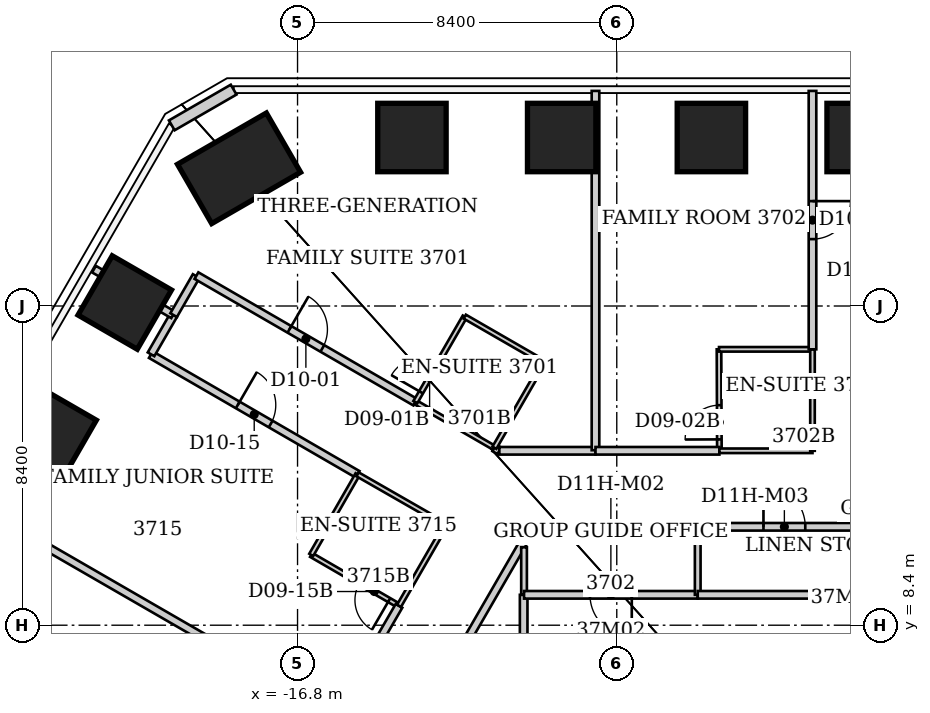
"""IFC4 building model, lengths in metres.
Left out: names, types, materials, properties, quantities, classifications, styles, units other than length and angle.
Written with IfcOpenShell. Run it as: python <this file> out.ifc"""

import sys

from ifc_helpers import new_model, si_unit, direction, frame, frame_2d, origin, origin_2d, place, context, subcontext, project, spatial, rectangle, extrude, element, fill, save


model = new_model("IFC4")
c1 = context("Model", 3, precision=1e-05, world=origin(), true_north=direction((0.0, 1.0)))
c2 = subcontext(c1, "Body", "Model", "MODEL_VIEW")
j1 = project(units=[si_unit("LENGTHUNIT", "METRE"), si_unit("PLANEANGLEUNIT", "RADIAN")], contexts=[c1])
p1 = place(None, origin())
s1 = spatial("IfcSite", under=j1, at=p1, CompositionType="ELEMENT")
p2 = place(p1, origin())
s2 = spatial("IfcBuilding", under=s1, at=p2, CompositionType="ELEMENT")
p3 = place(p2, frame((0.0, 0.0, 150.0)))
s3 = spatial("IfcBuildingStorey", under=s2, at=p3, CompositionType="ELEMENT", Elevation=150.0)
p4 = place(p3, frame((-13.79, 21.234, -0.07), z_axis=(0.030672908952, -0.047237539454, 0.998412633896), x_axis=(0.001517539958, 0.998883682108, 0.047213204619)))
e1 = element("IfcColumn", 1, at=p4, inside=s3, PredefinedType="COLUMN", context=c2, shape_type="SweptSolid", body=[
    extrude(rectangle(XDim=1.8, YDim=1.8, at=origin_2d()), origin(), (0.0, 0.0, 1.0), 3.876),
])
p5 = place(p3, frame((-9.85, 21.234, -0.062), z_axis=(0.021904461352, -0.047280811392, 0.998641436877), x_axis=(0.001524932633, 0.998881518018, 0.047258729796)))
e2 = element("IfcColumn", 2, at=p5, inside=s3, PredefinedType="COLUMN", context=c2, shape_type="SweptSolid", body=[
    extrude(rectangle(XDim=1.8, YDim=1.8, at=origin_2d()), origin(), (0.0, 0.0, 1.0), 3.868),
])
p6 = place(p3, frame((-5.91, 21.234, -0.054), z_axis=(0.013158701657, -0.047257452585, 0.998796066145), x_axis=(0.000510527597, 0.998882736188, 0.047254827349)))
e3 = element("IfcColumn", 3, at=p6, inside=s3, PredefinedType="COLUMN", context=c2, shape_type="SweptSolid", body=[
    extrude(rectangle(XDim=1.8, YDim=1.8, at=origin_2d()), origin(), (0.0, 0.0, 1.0), 3.859),
])
p7 = place(p3, frame((-1.97, 21.234, -0.046), z_axis=(0.004374618876, -0.047296604079, 0.998871310006), x_axis=(0.000487124641, 0.998880850263, 0.047294922418)))
e4 = element("IfcColumn", 4, at=p7, inside=s3, PredefinedType="COLUMN", context=c2, shape_type="SweptSolid", body=[
    extrude(rectangle(XDim=1.8, YDim=1.8, at=origin_2d()), origin(), (0.0, 0.0, 1.0), 3.851),
])
p8 = place(p3, frame((-23.324, 13.466, -0.053), z_axis=(0.0511051556, -0.029474013007, 0.998258255978), x_axis=(-0.864748173328, 0.498728525707, 0.058995375849)))
e5 = element("IfcColumn", 5, at=p8, inside=s3, PredefinedType="COLUMN", context=c2, shape_type="SweptSolid", body=[
    extrude(rectangle(XDim=1.8, YDim=1.8, at=origin_2d()), origin(), (0.0, 0.0, 1.0), 3.86),
])
p9 = place(p3, frame((-21.346, 16.891, -0.061), z_axis=(0.046773827899, -0.036989828811, 0.998220397301), x_axis=(-0.864919891938, 0.498430416416, 0.058997461992)))
e6 = element("IfcColumn", 6, at=p9, inside=s3, PredefinedType="COLUMN", context=c2, shape_type="SweptSolid", body=[
    extrude(rectangle(XDim=1.8, YDim=1.8, at=origin_2d()), origin(), (0.0, 0.0, 1.0), 3.868),
])
p10 = place(p3, frame((-18.339, 20.424, -0.071), z_axis=(0.041102575275, -0.045760447511, 0.998106487179), x_axis=(-0.498560434841, 0.864763607509, 0.060178035354)))
e7 = element("IfcColumn", 7, at=p10, inside=s3, PredefinedType="COLUMN", context=c2, shape_type="SweptSolid", body=[
    extrude(rectangle(XDim=1.8, YDim=2.7, at=origin_2d()), origin(), (0.0, 0.0, 1.0), 3.879),
])
p11 = place(p3, frame((-20.11, 21.554, 0.0), z_axis=(0.0, 0.0, 1.0), x_axis=(0.865988793993, 0.500063404658, 0.0)))
e8 = element("IfcWall", 8, at=p11, inside=s3, PredefinedType="SOLIDWALL", context=c2, shape_type="SweptSolid", body=[
    extrude(rectangle(XDim=1.88, YDim=0.3, at=frame_2d((0.94, 0.0))), origin(), (0.0, 0.0, 1.0), 3.64),
])
p12 = place(p3, frame((-25.714, 11.795, 0.0), z_axis=(0.0, 0.0, 1.0), x_axis=(0.866045467449, -0.499965247104, 0.0)))
e9 = element("IfcWall", 9, at=p12, inside=s3, PredefinedType="PARTITIONING", context=c2, shape_type="SweptSolid", body=[
    extrude(rectangle(XDim=11.461, YDim=0.2, at=frame_2d((5.73, 0.0))), origin(), (0.0, 0.0, 1.0), 3.64),
])
p13 = place(p3, frame((-20.66, 15.52, 0.0), z_axis=(0.0, 0.0, 1.0), x_axis=(0.86537753305, -0.501120469839, 0.0)))
e10 = element("IfcWall", 10, at=p13, inside=s3, PredefinedType="PARTITIONING", context=c2, shape_type="SweptSolid", body=[
    extrude(rectangle(XDim=6.286, YDim=0.2, at=frame_2d((3.143, 0.0))), origin(), (0.0, 0.0, 1.0), 3.64),
])
p14 = place(p13, frame((2.643, 0.0, 0.0)))
e11 = element("IfcOpeningElement", 11, at=p14, cuts=e10, PredefinedType="OPENING", context=c2, shape_type="SweptSolid", body=[
    extrude(rectangle(XDim=1.0, YDim=2.13, at=frame_2d((0.5, 1.065))), frame((0.0, 0.1, 0.0), z_axis=(0.0, -1.0, 0.0), x_axis=(1.0, 0.0, 0.0)), (0.0, 0.0, 1.0), 0.2),
])
p15 = place(p3, frame((-20.655, 15.529, 0.0), z_axis=(0.0, 0.0, 1.0), x_axis=(0.49964553876, 0.86622995538, 0.0)))
e12 = element("IfcWall", 12, at=p15, inside=s3, PredefinedType="PARTITIONING", context=c2, shape_type="SweptSolid", body=[
    extrude(rectangle(XDim=1.191, YDim=0.2, at=frame_2d((0.595, 0.0))), origin(), (0.0, 0.0, 1.0), 3.64),
])
p16 = place(p3, frame((-20.073, 16.567, 0.0), z_axis=(0.0, 0.0, 1.0), x_axis=(-0.866023315909, 0.500003616288, 0.0)))
e13 = element("IfcWall", 13, at=p16, inside=s3, PredefinedType="PARTITIONING", context=c2, shape_type="SweptSolid", body=[
    extrude(rectangle(XDim=2.405, YDim=0.2, at=frame_2d((1.203, 0.0))), origin(), (0.0, 0.0, 1.0), 3.64),
])
p17 = place(p3, frame((-20.06, 16.56, 0.0), z_axis=(0.0, 0.0, 1.0), x_axis=(0.499704629046, 0.866195869137, 0.0)))
e14 = element("IfcWall", 14, at=p17, inside=s3, PredefinedType="PARTITIONING", context=c2, shape_type="SweptSolid", body=[
    extrude(rectangle(XDim=1.186, YDim=0.2, at=frame_2d((0.593, 0.0))), origin(), (0.0, 0.0, 1.0), 3.64),
])
p18 = place(p3, frame((-19.46, 17.6, 0.0), z_axis=(0.0, 0.0, 1.0), x_axis=(0.865623013862, -0.50069631302, 0.0)))
e15 = element("IfcWall", 15, at=p18, inside=s3, PredefinedType="PARTITIONING", context=c2, shape_type="SweptSolid", body=[
    extrude(rectangle(XDim=6.653, YDim=0.2, at=frame_2d((3.327, 0.0))), origin(), (0.0, 0.0, 1.0), 3.64),
])
p19 = place(p18, frame((2.827, 0.0, 0.0)))
e16 = element("IfcOpeningElement", 16, at=p19, cuts=e15, PredefinedType="OPENING", context=c2, shape_type="SweptSolid", body=[
    extrude(rectangle(XDim=1.0, YDim=2.13, at=frame_2d((0.5, 1.065))), frame((0.0, 0.1, 0.0), z_axis=(0.0, -1.0, 0.0), x_axis=(1.0, 0.0, 0.0)), (0.0, 0.0, 1.0), 0.2),
])
p20 = place(p3, frame((-16.44, 10.25, 0.0), z_axis=(0.0, 0.0, 1.0), x_axis=(0.864966903181, -0.501828911485, 0.0)))
e17 = element("IfcWall", 17, at=p20, inside=s3, PredefinedType="PARTITIONING", context=c2, shape_type="SweptSolid", body=[
    extrude(rectangle(XDim=2.67, YDim=0.12, at=frame_2d((1.335, 0.0))), origin(), (0.0, 0.0, 1.0), 3.64),
])
p21 = place(p20, frame((1.47, 0.0, 0.0)))
e18 = element("IfcOpeningElement", 18, at=p21, cuts=e17, PredefinedType="OPENING", context=c2, shape_type="SweptSolid", body=[
    extrude(rectangle(XDim=0.9, YDim=2.03, at=frame_2d((0.45, 1.015))), frame((0.0, 0.06, 0.0), z_axis=(0.0, -1.0, 0.0), x_axis=(1.0, 0.0, 0.0)), (0.0, 0.0, 1.0), 0.12),
])
p22 = place(p3, frame((-15.78, 6.06, 0.0), z_axis=(0.0, 0.0, 1.0), x_axis=(0.501088872721, 0.865395829453, 0.0)))
e19 = element("IfcWall", 19, at=p22, inside=s3, PredefinedType="PARTITIONING", context=c2, shape_type="SweptSolid", body=[
    extrude(rectangle(XDim=3.293, YDim=0.2, at=frame_2d((1.646, 0.0))), origin(), (0.0, 0.0, 1.0), 3.64),
])
p23 = place(p3, frame((-15.41, 2.7, 0.0), z_axis=(0.0, 0.0, 1.0), x_axis=(0.500237524763, 0.865888225361, 0.0)))
e20 = element("IfcWall", 20, at=p23, inside=s3, PredefinedType="PARTITIONING", context=c2, shape_type="SweptSolid", body=[
    extrude(rectangle(XDim=9.135, YDim=0.2, at=frame_2d((4.568, 0.0))), origin(), (0.0, 0.0, 1.0), 3.64),
])
p24 = place(p3, frame((-15.22, 12.37, 0.0), z_axis=(0.0, 0.0, 1.0), x_axis=(-0.498748634132, -0.866746675766, 0.0)))
e21 = element("IfcWall", 21, at=p24, inside=s3, PredefinedType="PARTITIONING", context=c2, shape_type="SweptSolid", body=[
    extrude(rectangle(XDim=2.446, YDim=0.12, at=frame_2d((1.223, 0.0))), origin(), (0.0, 0.0, 1.0), 3.64),
])
p25 = place(p3, frame((-15.22, 12.37, 0.0), z_axis=(0.0, 0.0, 1.0), x_axis=(0.867545659855, -0.497357545501, 0.0)))
e22 = element("IfcWall", 22, at=p25, inside=s3, PredefinedType="PARTITIONING", context=c2, shape_type="SweptSolid", body=[
    extrude(rectangle(XDim=2.674, YDim=0.12, at=frame_2d((1.337, 0.0))), origin(), (0.0, 0.0, 1.0), 3.64),
])
p26 = place(p3, frame((-14.13, 8.91, 0.0), z_axis=(0.0, 0.0, 1.0), x_axis=(0.500046071023, 0.865998803033, 0.0)))
e23 = element("IfcWall", 23, at=p26, inside=s3, PredefinedType="PARTITIONING", context=c2, shape_type="SweptSolid", body=[
    extrude(rectangle(XDim=2.46, YDim=0.12, at=frame_2d((1.23, 0.0))), origin(), (0.0, 0.0, 1.0), 3.64),
])
p27 = place(p3, frame((-13.701, 14.269, 0.0), z_axis=(0.0, 0.0, 1.0), x_axis=(0.865609526999, -0.500719628902, 0.0)))
e24 = element("IfcWall", 24, at=p27, inside=s3, PredefinedType="PARTITIONING", context=c2, shape_type="SweptSolid", body=[
    extrude(rectangle(XDim=2.401, YDim=0.12, at=frame_2d((1.201, 0.0))), origin(), (0.0, 0.0, 1.0), 3.64),
])
p28 = place(p3, frame((-12.4, 16.52, 0.0), z_axis=(0.0, 0.0, 1.0), x_axis=(-0.500291685314, -0.865856933682, 0.0)))
e25 = element("IfcWall", 25, at=p28, inside=s3, PredefinedType="PARTITIONING", context=c2, shape_type="SweptSolid", body=[
    extrude(rectangle(XDim=2.599, YDim=0.12, at=frame_2d((1.299, 0.0))), origin(), (0.0, 0.0, 1.0), 3.64),
])
p29 = place(p28, frame((1.399, 0.0, 0.0)))
e26 = element("IfcOpeningElement", 26, at=p29, cuts=e25, PredefinedType="OPENING", context=c2, shape_type="SweptSolid", body=[
    extrude(rectangle(XDim=0.9, YDim=2.03, at=frame_2d((0.45, 1.015))), frame((0.0, 0.06, 0.0), z_axis=(0.0, -1.0, 0.0), x_axis=(1.0, 0.0, 0.0)), (0.0, 0.0, 1.0), 0.12),
])
p30 = place(p3, frame((-11.622, 13.066, 0.0), z_axis=(0.0, 0.0, 1.0), x_axis=(0.865572302129, -0.500783975169, 0.0)))
e27 = element("IfcWall", 27, at=p30, inside=s3, PredefinedType="PARTITIONING", context=c2, shape_type="SweptSolid", body=[
    extrude(rectangle(XDim=0.153, YDim=0.2, at=frame_2d((0.076, 0.0))), origin(), (0.0, 0.0, 1.0), 3.64),
])
p31 = place(p3, frame((-11.62, 13.07, 0.0), z_axis=(0.0, 0.0, 1.0), x_axis=(0.500291685314, 0.865856933682, 0.0)))
e28 = element("IfcWall", 28, at=p31, inside=s3, PredefinedType="PARTITIONING", context=c2, shape_type="SweptSolid", body=[
    extrude(rectangle(XDim=2.599, YDim=0.12, at=frame_2d((1.299, 0.0))), origin(), (0.0, 0.0, 1.0), 3.64),
])
p32 = place(p3, frame((-10.85, 9.2, 0.0), z_axis=(0.0, 0.0, 1.0), x_axis=(0.0, -1.0, 0.0)))
e29 = element("IfcWall", 29, at=p32, inside=s3, PredefinedType="PARTITIONING", context=c2, shape_type="SweptSolid", body=[
    extrude(rectangle(XDim=14.39, YDim=0.2, at=frame_2d((7.195, 0.0))), origin(), (0.0, 0.0, 1.0), 3.64),
])
p33 = place(p32, frame((6.645, 0.0, 0.0)))
e30 = element("IfcOpeningElement", 30, at=p33, cuts=e29, PredefinedType="OPENING", context=c2, shape_type="SweptSolid", body=[
    extrude(rectangle(XDim=1.1, YDim=2.2, at=frame_2d((0.55, 1.1))), frame((0.0, 0.1, 0.0), z_axis=(0.0, -1.0, 0.0), x_axis=(1.0, 0.0, 0.0)), (0.0, 0.0, 1.0), 0.2),
])
p34 = place(p3, frame((-10.84, 10.45, 0.0), z_axis=(0.0, 0.0, 1.0), x_axis=(0.0, -1.0, 0.0)))
e31 = element("IfcWall", 31, at=p34, inside=s3, PredefinedType="PARTITIONING", context=c2, shape_type="SweptSolid", body=[
    extrude(rectangle(XDim=1.25, YDim=0.15, at=frame_2d((0.625, 0.0))), origin(), (0.0, 0.0, 1.0), 3.64),
])
p35 = place(p3, frame((-10.84, 10.61, 0.0), z_axis=(0.0, 0.0, 1.0), x_axis=(0.501518373175, 0.865146994081, 0.0)))
e32 = element("IfcWall", 32, at=p35, inside=s3, PredefinedType="PARTITIONING", context=c2, shape_type="SweptSolid", body=[
    extrude(rectangle(XDim=0.439, YDim=0.2, at=frame_2d((0.22, 0.0))), origin(), (0.0, 0.0, 1.0), 3.64),
])
p36 = place(p3, frame((-10.62, 10.99, 0.0), z_axis=(0.0, 0.0, 1.0), x_axis=(1.0, 0.0, 0.0)))
e33 = element("IfcWall", 33, at=p36, inside=s3, PredefinedType="PARTITIONING", context=c2, shape_type="SweptSolid", body=[
    extrude(rectangle(XDim=4.35, YDim=0.2, at=frame_2d((2.175, 0.0))), origin(), (0.0, 0.0, 1.0), 3.64),
])
p37 = place(p3, frame((-10.32, 15.32, 0.0), z_axis=(0.0, 0.0, 1.0), x_axis=(-0.866177122335, 0.499737123639, 0.0)))
e34 = element("IfcWall", 34, at=p37, inside=s3, PredefinedType="PARTITIONING", context=c2, shape_type="SweptSolid", body=[
    extrude(rectangle(XDim=2.401, YDim=0.12, at=frame_2d((1.201, 0.0))), origin(), (0.0, 0.0, 1.0), 3.64),
])
p38 = place(p3, frame((-8.96, 12.99, 0.0), z_axis=(0.0, 0.0, 1.0), x_axis=(-1.0, 0.0, 0.0)))
e35 = element("IfcWall", 35, at=p38, inside=s3, PredefinedType="PARTITIONING", context=c2, shape_type="SweptSolid", body=[
    extrude(rectangle(XDim=2.53, YDim=0.2, at=frame_2d((1.265, 0.0))), origin(), (0.0, 0.0, 1.0), 3.64),
])
p39 = place(p3, frame((-8.96, 22.46, 0.0), z_axis=(0.0, 0.0, 1.0), x_axis=(0.0, -1.0, 0.0)))
e36 = element("IfcWall", 36, at=p39, inside=s3, PredefinedType="PARTITIONING", context=c2, shape_type="SweptSolid", body=[
    extrude(rectangle(XDim=9.455, YDim=0.2, at=frame_2d((4.728, 0.0))), origin(), (0.0, 0.0, 1.0), 3.64),
])
p40 = place(p3, frame((-6.27, 9.2, 0.0), z_axis=(0.0, 0.0, 1.0), x_axis=(-1.0, 0.0, 0.0)))
e37 = element("IfcWall", 37, at=p40, inside=s3, PredefinedType="PARTITIONING", context=c2, shape_type="SweptSolid", body=[
    extrude(rectangle(XDim=4.57, YDim=0.2, at=frame_2d((2.285, 0.0))), origin(), (0.0, 0.0, 1.0), 3.64),
])
p41 = place(p40, frame((1.735, 0.0, 0.0)))
e38 = element("IfcOpeningElement", 38, at=p41, cuts=e37, PredefinedType="OPENING", context=c2, shape_type="SweptSolid", body=[
    extrude(rectangle(XDim=1.1, YDim=2.2, at=frame_2d((0.55, 1.1))), frame((0.0, 0.1, 0.0), z_axis=(0.0, -1.0, 0.0), x_axis=(1.0, 0.0, 0.0)), (0.0, 0.0, 1.0), 0.2),
])
p42 = place(p3, frame((-6.27, 10.99, 0.0), z_axis=(0.0, 0.0, 1.0), x_axis=(0.0, -1.0, 0.0)))
e39 = element("IfcWall", 39, at=p42, inside=s3, PredefinedType="PARTITIONING", context=c2, shape_type="SweptSolid", body=[
    extrude(rectangle(XDim=1.79, YDim=0.15, at=frame_2d((0.895, 0.0))), origin(), (0.0, 0.0, 1.0), 3.64),
])
p43 = place(p3, frame((-6.27, 10.99, 0.0), z_axis=(0.0, 0.0, 1.0), x_axis=(1.0, 0.0, 0.0)))
e40 = element("IfcWall", 40, at=p43, inside=s3, PredefinedType="PARTITIONING", context=c2, shape_type="SweptSolid", body=[
    extrude(rectangle(XDim=4.56, YDim=0.2, at=frame_2d((2.28, 0.0))), origin(), (0.0, 0.0, 1.0), 3.64),
])
p44 = place(p43, frame((1.73, 0.0, 0.0)))
e41 = element("IfcOpeningElement", 41, at=p44, cuts=e40, PredefinedType="OPENING", context=c2, shape_type="SweptSolid", body=[
    extrude(rectangle(XDim=1.1, YDim=2.2, at=frame_2d((0.55, 1.1))), frame((0.0, 0.1, 0.0), z_axis=(0.0, -1.0, 0.0), x_axis=(1.0, 0.0, 0.0)), (0.0, 0.0, 1.0), 0.2),
])
p45 = place(p3, frame((-5.71, 15.66, 0.0), z_axis=(0.0, 0.0, 1.0), x_axis=(0.003749059241, -0.999992972253, 0.0)))
e42 = element("IfcWall", 42, at=p45, inside=s3, PredefinedType="PARTITIONING", context=c2, shape_type="SweptSolid", body=[
    extrude(rectangle(XDim=2.67, YDim=0.12, at=frame_2d((1.335, 0.0))), origin(), (0.0, 0.0, 1.0), 3.64),
])
p46 = place(p45, frame((1.47, 0.0, 0.0)))
e43 = element("IfcOpeningElement", 43, at=p46, cuts=e42, PredefinedType="OPENING", context=c2, shape_type="SweptSolid", body=[
    extrude(rectangle(XDim=0.9, YDim=2.03, at=frame_2d((0.45, 1.015))), frame((0.0, 0.06, 0.0), z_axis=(0.0, -1.0, 0.0), x_axis=(1.0, 0.0, 0.0)), (0.0, 0.0, 1.0), 0.12),
])
p47 = place(p3, frame((-5.7, 12.99, 0.0), z_axis=(0.0, 0.0, 1.0), x_axis=(-1.0, 0.0, 0.0)))
e44 = element("IfcWall", 44, at=p47, inside=s3, PredefinedType="PARTITIONING", context=c2, shape_type="SweptSolid", body=[
    extrude(rectangle(XDim=3.26, YDim=0.2, at=frame_2d((1.63, 0.0))), origin(), (0.0, 0.0, 1.0), 3.64),
])
p48 = place(p3, frame((-3.25, 12.99, 0.0), z_axis=(0.0, 0.0, 1.0), x_axis=(-1.0, 0.0, 0.0)))
e45 = element("IfcWall", 45, at=p48, inside=s3, PredefinedType="PARTITIONING", context=c2, shape_type="SweptSolid", body=[
    extrude(rectangle(XDim=2.45, YDim=0.12, at=frame_2d((1.225, 0.0))), origin(), (0.0, 0.0, 1.0), 3.64),
])
p49 = place(p3, frame((-3.25, 15.66, 0.0), z_axis=(0.0, 0.0, 1.0), x_axis=(-1.0, 0.0, 0.0)))
e46 = element("IfcWall", 46, at=p49, inside=s3, PredefinedType="PARTITIONING", context=c2, shape_type="SweptSolid", body=[
    extrude(rectangle(XDim=2.46, YDim=0.12, at=frame_2d((1.23, 0.0))), origin(), (0.0, 0.0, 1.0), 3.64),
])
p50 = place(p3, frame((-3.25, 15.66, 0.0), z_axis=(0.0, 0.0, 1.0), x_axis=(0.0, -1.0, 0.0)))
e47 = element("IfcWall", 47, at=p50, inside=s3, PredefinedType="PARTITIONING", context=c2, shape_type="SweptSolid", body=[
    extrude(rectangle(XDim=2.67, YDim=0.12, at=frame_2d((1.335, 0.0))), origin(), (0.0, 0.0, 1.0), 3.64),
])
p51 = place(p3, frame((-3.25, 22.46, 0.0), z_axis=(0.0, 0.0, 1.0), x_axis=(0.0, -1.0, 0.0)))
e48 = element("IfcWall", 48, at=p51, inside=s3, PredefinedType="PARTITIONING", context=c2, shape_type="SweptSolid", body=[
    extrude(rectangle(XDim=6.8, YDim=0.2, at=frame_2d((3.4, 0.0))), origin(), (0.0, 0.0, 1.0), 3.64),
])
p52 = place(p51, frame((2.9, 0.0, 0.0)))
e49 = element("IfcOpeningElement", 49, at=p52, cuts=e48, PredefinedType="OPENING", context=c2, shape_type="SweptSolid", body=[
    extrude(rectangle(XDim=1.0, YDim=2.13, at=frame_2d((0.5, 1.065))), frame((0.0, 0.1, 0.0), z_axis=(0.0, -1.0, 0.0), x_axis=(1.0, 0.0, 0.0)), (0.0, 0.0, 1.0), 0.2),
])
p53 = place(p3, frame((-1.71, 9.2, 0.0), z_axis=(0.0, 0.0, 1.0), x_axis=(-1.0, 0.0, 0.0)))
e50 = element("IfcWall", 50, at=p53, inside=s3, PredefinedType="PARTITIONING", context=c2, shape_type="SweptSolid", body=[
    extrude(rectangle(XDim=4.56, YDim=0.2, at=frame_2d((2.28, 0.0))), origin(), (0.0, 0.0, 1.0), 3.64),
])
p54 = place(p19, origin())
e51 = element("IfcDoor", 51, at=p54, inside=s3, OperationType="SINGLE_SWING_LEFT", PredefinedType="DOOR", context=c2, shape_type="SweptSolid", body=[
    extrude(rectangle(XDim=1.0, YDim=2.13, at=frame_2d((0.5, 1.065))), frame((0.0, 0.025, 0.0), z_axis=(0.0, -1.0, 0.0), x_axis=(1.0, 0.0, 0.0)), (0.0, 0.0, 1.0), 0.05),
])
fill(e16, e51)
p55 = place(p29, origin())
e52 = element("IfcDoor", 52, at=p55, inside=s3, OperationType="SINGLE_SWING_RIGHT", PredefinedType="DOOR", context=c2, shape_type="SweptSolid", body=[
    extrude(rectangle(XDim=0.9, YDim=2.03, at=frame_2d((0.45, 1.015))), frame((0.0, 0.025, 0.0), z_axis=(0.0, -1.0, 0.0), x_axis=(1.0, 0.0, 0.0)), (0.0, 0.0, 1.0), 0.05),
])
fill(e26, e52)
p56 = place(p52, origin())
e53 = element("IfcDoor", 53, at=p56, inside=s3, OperationType="SINGLE_SWING_LEFT", PredefinedType="DOOR", context=c2, shape_type="SweptSolid", body=[
    extrude(rectangle(XDim=1.0, YDim=2.13, at=frame_2d((0.5, 1.065))), frame((0.0, 0.025, 0.0), z_axis=(0.0, -1.0, 0.0), x_axis=(1.0, 0.0, 0.0)), (0.0, 0.0, 1.0), 0.05),
])
fill(e49, e53)
p57 = place(p46, origin())
e54 = element("IfcDoor", 54, at=p57, inside=s3, OperationType="SINGLE_SWING_RIGHT", PredefinedType="DOOR", context=c2, shape_type="SweptSolid", body=[
    extrude(rectangle(XDim=0.9, YDim=2.03, at=frame_2d((0.45, 1.015))), frame((0.0, 0.025, 0.0), z_axis=(0.0, -1.0, 0.0), x_axis=(1.0, 0.0, 0.0)), (0.0, 0.0, 1.0), 0.05),
])
fill(e43, e54)
p58 = place(p14, origin())
e55 = element("IfcDoor", 55, at=p58, inside=s3, OperationType="SINGLE_SWING_LEFT", PredefinedType="DOOR", context=c2, shape_type="SweptSolid", body=[
    extrude(rectangle(XDim=1.0, YDim=2.13, at=frame_2d((0.5, 1.065))), frame((0.0, 0.025, 0.0), z_axis=(0.0, -1.0, 0.0), x_axis=(1.0, 0.0, 0.0)), (0.0, 0.0, 1.0), 0.05),
])
fill(e11, e55)
p59 = place(p21, origin())
e56 = element("IfcDoor", 56, at=p59, inside=s3, OperationType="SINGLE_SWING_RIGHT", PredefinedType="DOOR", context=c2, shape_type="SweptSolid", body=[
    extrude(rectangle(XDim=0.9, YDim=2.03, at=frame_2d((0.45, 1.015))), frame((0.0, 0.025, 0.0), z_axis=(0.0, -1.0, 0.0), x_axis=(1.0, 0.0, 0.0)), (0.0, 0.0, 1.0), 0.05),
])
fill(e18, e56)
p60 = place(p41, origin())
e57 = element("IfcDoor", 57, at=p60, inside=s3, OperationType="SINGLE_SWING_LEFT", PredefinedType="DOOR", context=c2, shape_type="SweptSolid", body=[
    extrude(rectangle(XDim=1.1, YDim=2.2, at=frame_2d((0.55, 1.1))), frame((0.0, 0.025, 0.0), z_axis=(0.0, -1.0, 0.0), x_axis=(1.0, 0.0, 0.0)), (0.0, 0.0, 1.0), 0.05),
])
fill(e38, e57)
p61 = place(p44, origin())
e58 = element("IfcDoor", 58, at=p61, inside=s3, OperationType="SINGLE_SWING_LEFT", PredefinedType="DOOR", context=c2, shape_type="SweptSolid", body=[
    extrude(rectangle(XDim=1.1, YDim=2.2, at=frame_2d((0.55, 1.1))), frame((0.0, 0.025, 0.0), z_axis=(0.0, -1.0, 0.0), x_axis=(1.0, 0.0, 0.0)), (0.0, 0.0, 1.0), 0.05),
])
fill(e41, e58)
save(model, sys.argv[1])
